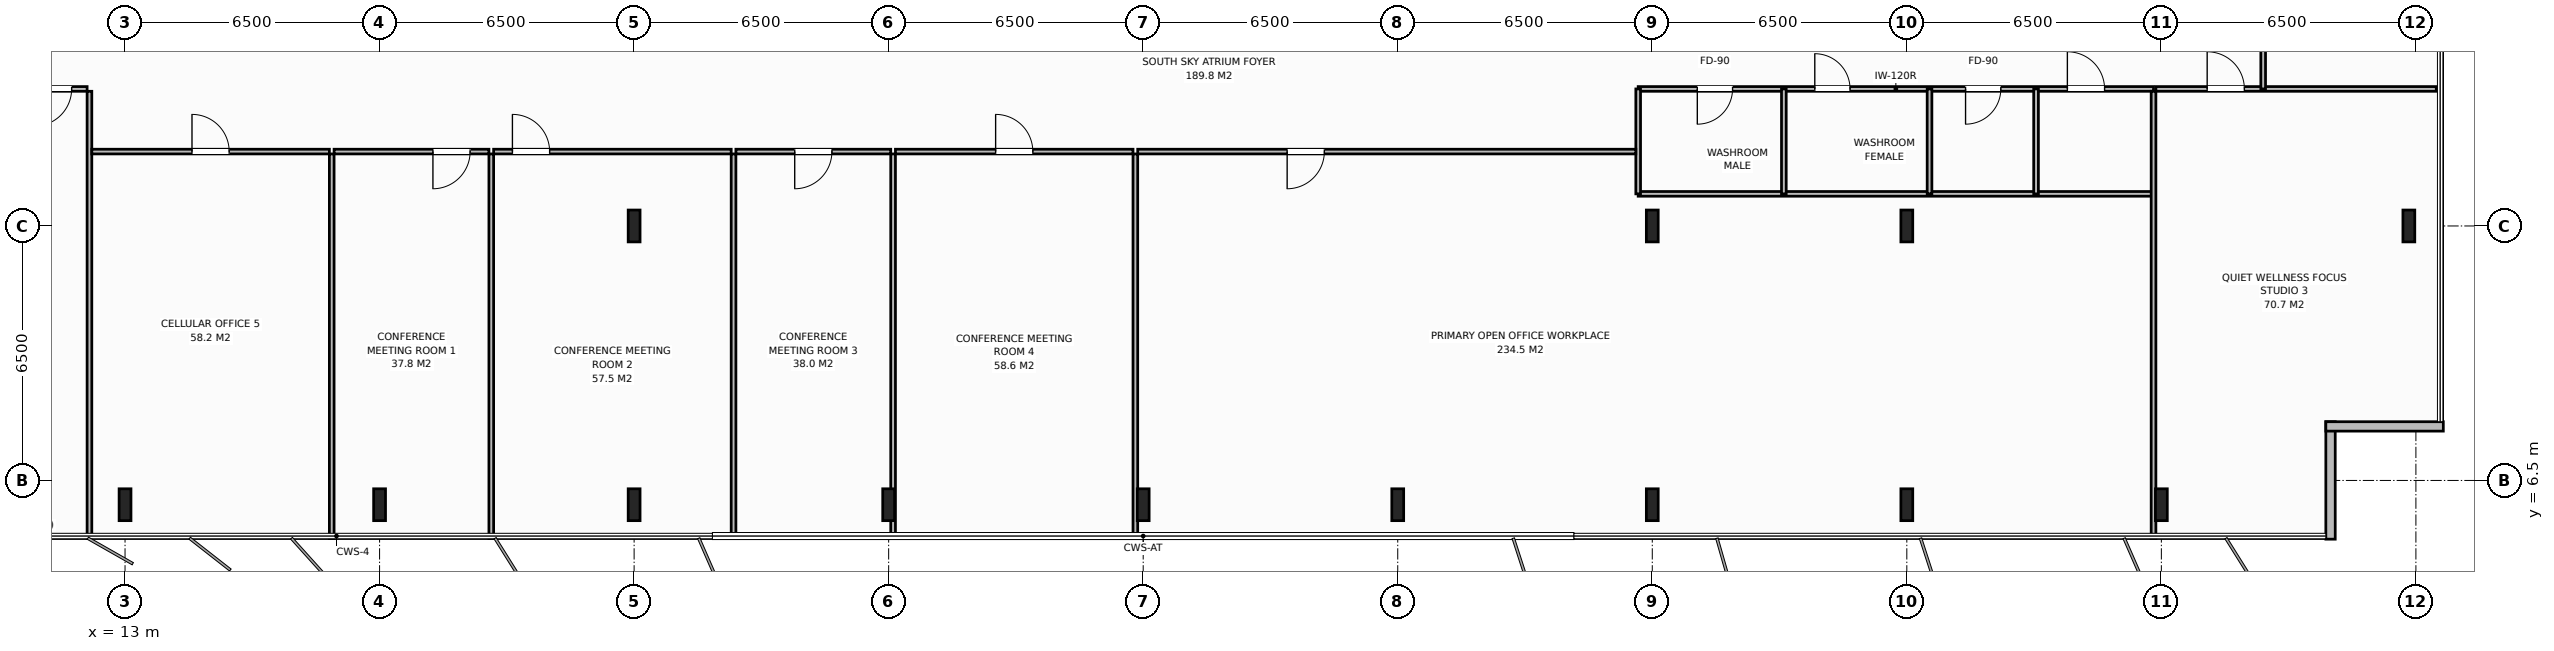
"""IFC4 building model, lengths in metres.
Left out: names, types, materials, properties, quantities, classifications, styles, units other than length and angle.
Written with IfcOpenShell. Run it as: python <this file> out.ifc"""

import sys

from ifc_helpers import new_model, si_unit, direction, frame, frame_2d, origin, origin_2d, place, context, subcontext, project, spatial, rectangle, i_section, extrude, element, fill, save


model = new_model("IFC4")
c1 = context("Model", 3, precision=1e-05, world=origin(), true_north=direction((0.0, 1.0)))
c2 = subcontext(c1, "Body", "Model", "MODEL_VIEW")
j1 = project(units=[si_unit("LENGTHUNIT", "METRE"), si_unit("PLANEANGLEUNIT", "RADIAN")], contexts=[c1])
p1 = place(None, origin())
s1 = spatial("IfcSite", under=j1, at=p1, CompositionType="ELEMENT")
p2 = place(p1, origin())
s2 = spatial("IfcBuilding", under=s1, at=p2, CompositionType="ELEMENT")
p3 = place(p2, frame((0.0, 0.0, 217.6)))
s3 = spatial("IfcBuildingStorey", under=s2, at=p3, CompositionType="ELEMENT", Elevation=217.6)
for number, where, z_axis, x_axis in (
    (1, (58.5, 13.0, 0.0), (0.0, 0.0, 1.0), (1.0, 0.0, 0.0)),
    (2, (26.0, 13.0, 0.0), (0.0, 0.0, 1.0), (1.0, 0.0, 0.0)),
    (3, (52.0, 13.0, 0.0), (0.0, 0.0, 1.0), (1.0, 0.0, 0.0)),
    (4, (13.0, 5.88, 0.0), (0.0, 0.0, 1.0), (1.0, 0.0, 0.0)),
    (5, (19.5, 5.88, 0.0), (0.0, 0.0, 1.0), (1.0, 0.0, 0.0)),
    (6, (26.0, 5.88, 0.0), (0.0, 0.0, 1.0), (1.0, 0.0, 0.0)),
    (7, (32.5, 5.88, 0.0), (0.0, 0.0, 1.0), (1.0, 0.0, 0.0)),
    (8, (39.0, 5.88, 0.0), (0.0, 0.0, 1.0), (1.0, 0.0, 0.0)),
    (9, (45.5, 5.88, 0.0), (0.0, 0.0, 1.0), (1.0, 0.0, 0.0)),
    (10, (52.0, 5.88, 0.0), (0.0, 0.0, 1.0), (1.0, 0.0, 0.0)),
    (11, (58.5, 5.88, 0.0), (0.0, 0.0, 1.0), (1.0, 0.0, 0.0)),
    (12, (65.0, 5.88, 0.0), (0.0, 0.0, 1.0), (1.0, 0.0, 0.0)),
    (13, (71.32, 13.0, 0.0), (0.0, 0.0, 1.0), (1.0, 0.0, 0.0)),
):
    element("IfcColumn", number, at=place(p3, frame(where, z_axis=z_axis, x_axis=x_axis)), inside=s3, PredefinedType="COLUMN", context=c2, shape_type="SweptSolid", body=[
        extrude(i_section(OverallWidth=0.303, OverallDepth=0.814, WebThickness=0.021, FlangeThickness=0.04, at=origin_2d()), origin(), (0.0, 0.0, 1.0), 3.8),
    ])
for number, where, z_axis, x_axis in (
    (14, (69.32, 8.0, 0.0), (0.0, 0.0, 1.0), (0.0, -1.0, 0.0)),
    (15, (72.2, 7.88, 0.0), (0.0, 0.0, 1.0), (-1.0, 0.0, 0.0)),
):
    element("IfcWall", number, at=place(p3, frame(where, z_axis=z_axis, x_axis=x_axis)), inside=s3, PredefinedType="STANDARD", context=c2, shape_type="SweptSolid", body=[
        extrude(rectangle(XDim=3.0, YDim=0.24, at=frame_2d((1.5, 0.0))), origin(), (0.0, 0.0, 1.0), 3.58),
    ])
p4 = place(p3, frame((51.64, 16.5, 0.0), z_axis=(0.0, 0.0, 1.0), x_axis=(1.0, 0.0, 0.0)))
e16 = element("IfcWall", 16, at=p4, inside=s3, PredefinedType="PARTITIONING", context=c2, shape_type="SweptSolid", body=[
    extrude(rectangle(XDim=13.16, YDim=0.12, at=frame_2d((6.58, 0.0))), origin(), (0.0, 0.0, 1.0), 3.58),
])
p5 = place(p4, frame((1.51, 0.0, 0.0)))
e17 = element("IfcOpeningElement", 17, at=p5, cuts=e16, PredefinedType="OPENING", context=c2, shape_type="SweptSolid", body=[
    extrude(rectangle(XDim=0.9, YDim=2.15, at=frame_2d((0.45, 1.075))), frame((0.0, 0.07, 0.0), z_axis=(0.0, -1.0, 0.0), x_axis=(1.0, 0.0, 0.0)), (0.0, 0.0, 1.0), 0.14),
])
p6 = place(p4, frame((4.51, 0.0, 0.0)))
e18 = element("IfcOpeningElement", 18, at=p6, cuts=e16, PredefinedType="OPENING", context=c2, shape_type="SweptSolid", body=[
    extrude(rectangle(XDim=0.9, YDim=2.15, at=frame_2d((0.45, 1.075))), frame((0.0, 0.07, 0.0), z_axis=(0.0, -1.0, 0.0), x_axis=(1.0, 0.0, 0.0)), (0.0, 0.0, 1.0), 0.14),
])
p7 = place(p4, frame((8.36, 0.0, 0.0)))
e19 = element("IfcOpeningElement", 19, at=p7, cuts=e16, PredefinedType="OPENING", context=c2, shape_type="SweptSolid", body=[
    extrude(rectangle(XDim=0.9, YDim=2.15, at=frame_2d((0.45, 1.075))), frame((0.0, 0.07, 0.0), z_axis=(0.0, -1.0, 0.0), x_axis=(1.0, 0.0, 0.0)), (0.0, 0.0, 1.0), 0.14),
])
p8 = place(p4, frame((10.96, 0.0, 0.0)))
e20 = element("IfcOpeningElement", 20, at=p8, cuts=e16, PredefinedType="OPENING", context=c2, shape_type="SweptSolid", body=[
    extrude(rectangle(XDim=0.95, YDim=2.15, at=frame_2d((0.475, 1.075))), frame((0.0, 0.07, 0.0), z_axis=(0.0, -1.0, 0.0), x_axis=(1.0, 0.0, 0.0)), (0.0, 0.0, 1.0), 0.14),
])
p9 = place(p3, frame((51.64, 13.82, 0.0), z_axis=(0.0, 0.0, 1.0), x_axis=(1.0, 0.0, 0.0)))
e21 = element("IfcWall", 21, at=p9, inside=s3, PredefinedType="PARTITIONING", context=c2, shape_type="SweptSolid", body=[
    extrude(rectangle(XDim=13.16, YDim=0.12, at=frame_2d((6.58, 0.0))), origin(), (0.0, 0.0, 1.0), 3.58),
])
for number, where, z_axis, x_axis in (
    (22, (51.64, 13.82, 0.0), (0.0, 0.0, 1.0), (0.0, 1.0, 0.0)),
    (23, (55.36, 13.82, 0.0), (0.0, 0.0, 1.0), (0.0, 1.0, 0.0)),
    (24, (59.08, 13.82, 0.0), (0.0, 0.0, 1.0), (0.0, 1.0, 0.0)),
    (25, (61.8, 13.82, 0.0), (0.0, 0.0, 1.0), (0.0, 1.0, 0.0)),
):
    element("IfcWall", number, at=place(p3, frame(where, z_axis=z_axis, x_axis=x_axis)), inside=s3, PredefinedType="PARTITIONING", context=c2, shape_type="SweptSolid", body=[
        extrude(rectangle(XDim=2.68, YDim=0.12, at=frame_2d((1.34, 0.0))), origin(), (0.0, 0.0, 1.0), 3.58),
    ])
p10 = place(p3, frame((12.091, 5.02, 0.0), z_axis=(0.0, 0.0, 1.0), x_axis=(0.0, 1.0, 0.0)))
e26 = element("IfcWall", 26, at=p10, inside=s3, PredefinedType="PARTITIONING", context=c2, shape_type="SweptSolid", body=[
    extrude(rectangle(XDim=11.42, YDim=0.12, at=frame_2d((5.71, 0.0))), origin(), (0.0, 0.0, 1.0), 3.58),
])
p11 = place(p3, frame((5.98, 16.5, 0.0), z_axis=(0.0, 0.0, 1.0), x_axis=(1.0, 0.0, 0.0)))
e27 = element("IfcWall", 27, at=p11, inside=s3, PredefinedType="PARTITIONING", context=c2, shape_type="SweptSolid", body=[
    extrude(rectangle(XDim=6.051, YDim=0.12, at=frame_2d((3.026, 0.0))), origin(), (0.0, 0.0, 1.0), 3.58),
])
p12 = place(p11, frame((4.706, 0.0, 0.0)))
e28 = element("IfcOpeningElement", 28, at=p12, cuts=e27, PredefinedType="OPENING", context=c2, shape_type="SweptSolid", body=[
    extrude(rectangle(XDim=0.95, YDim=2.15, at=frame_2d((0.475, 1.075))), frame((0.0, 0.07, 0.0), z_axis=(0.0, -1.0, 0.0), x_axis=(1.0, 0.0, 0.0)), (0.0, 0.0, 1.0), 0.14),
])
p13 = place(p3, frame((18.278, 5.02, 0.0), z_axis=(0.0, 0.0, 1.0), x_axis=(0.0, 1.0, 0.0)))
e29 = element("IfcWall", 29, at=p13, inside=s3, PredefinedType="PARTITIONING", context=c2, shape_type="SweptSolid", body=[
    extrude(rectangle(XDim=9.82, YDim=0.12, at=frame_2d((4.91, 0.0))), origin(), (0.0, 0.0, 1.0), 3.58),
])
p14 = place(p3, frame((12.151, 14.9, 0.0), z_axis=(0.0, 0.0, 1.0), x_axis=(1.0, 0.0, 0.0)))
e30 = element("IfcWall", 30, at=p14, inside=s3, PredefinedType="PARTITIONING", context=c2, shape_type="SweptSolid", body=[
    extrude(rectangle(XDim=6.067, YDim=0.12, at=frame_2d((3.033, 0.0))), origin(), (0.0, 0.0, 1.0), 3.58),
])
p15 = place(p14, frame((2.558, 0.0, 0.0)))
e31 = element("IfcOpeningElement", 31, at=p15, cuts=e30, PredefinedType="OPENING", context=c2, shape_type="SweptSolid", body=[
    extrude(rectangle(XDim=0.95, YDim=2.15, at=frame_2d((0.475, 1.075))), frame((0.0, 0.07, 0.0), z_axis=(0.0, -1.0, 0.0), x_axis=(1.0, 0.0, 0.0)), (0.0, 0.0, 1.0), 0.14),
])
p16 = place(p3, frame((22.352, 5.02, 0.0), z_axis=(0.0, 0.0, 1.0), x_axis=(0.0, 1.0, 0.0)))
e32 = element("IfcWall", 32, at=p16, inside=s3, PredefinedType="PARTITIONING", context=c2, shape_type="SweptSolid", body=[
    extrude(rectangle(XDim=9.82, YDim=0.12, at=frame_2d((4.91, 0.0))), origin(), (0.0, 0.0, 1.0), 3.58),
])
p17 = place(p3, frame((18.338, 14.9, 0.0), z_axis=(0.0, 0.0, 1.0), x_axis=(1.0, 0.0, 0.0)))
e33 = element("IfcWall", 33, at=p17, inside=s3, PredefinedType="PARTITIONING", context=c2, shape_type="SweptSolid", body=[
    extrude(rectangle(XDim=3.954, YDim=0.12, at=frame_2d((1.977, 0.0))), origin(), (0.0, 0.0, 1.0), 3.58),
])
p18 = place(p17, frame((2.524, 0.0, 0.0)))
e34 = element("IfcOpeningElement", 34, at=p18, cuts=e33, PredefinedType="OPENING", context=c2, shape_type="SweptSolid", body=[
    extrude(rectangle(XDim=0.95, YDim=2.15, at=frame_2d((0.475, 1.075))), frame((0.0, 0.07, 0.0), z_axis=(0.0, -1.0, 0.0), x_axis=(1.0, 0.0, 0.0)), (0.0, 0.0, 1.0), 0.14),
])
p19 = place(p3, frame((28.539, 5.02, 0.0), z_axis=(0.0, 0.0, 1.0), x_axis=(0.0, 1.0, 0.0)))
e35 = element("IfcWall", 35, at=p19, inside=s3, PredefinedType="PARTITIONING", context=c2, shape_type="SweptSolid", body=[
    extrude(rectangle(XDim=9.82, YDim=0.12, at=frame_2d((4.91, 0.0))), origin(), (0.0, 0.0, 1.0), 3.58),
])
p20 = place(p3, frame((22.412, 14.9, 0.0), z_axis=(0.0, 0.0, 1.0), x_axis=(1.0, 0.0, 0.0)))
e36 = element("IfcWall", 36, at=p20, inside=s3, PredefinedType="PARTITIONING", context=c2, shape_type="SweptSolid", body=[
    extrude(rectangle(XDim=6.067, YDim=0.12, at=frame_2d((3.033, 0.0))), origin(), (0.0, 0.0, 1.0), 3.58),
])
p21 = place(p20, frame((0.48, 0.0, 0.0)))
e37 = element("IfcOpeningElement", 37, at=p21, cuts=e36, PredefinedType="OPENING", context=c2, shape_type="SweptSolid", body=[
    extrude(rectangle(XDim=0.95, YDim=2.15, at=frame_2d((0.475, 1.075))), frame((0.0, 0.07, 0.0), z_axis=(0.0, -1.0, 0.0), x_axis=(1.0, 0.0, 0.0)), (0.0, 0.0, 1.0), 0.14),
])
p22 = place(p3, frame((32.613, 5.02, 0.0), z_axis=(0.0, 0.0, 1.0), x_axis=(0.0, 1.0, 0.0)))
e38 = element("IfcWall", 38, at=p22, inside=s3, PredefinedType="PARTITIONING", context=c2, shape_type="SweptSolid", body=[
    extrude(rectangle(XDim=9.82, YDim=0.12, at=frame_2d((4.91, 0.0))), origin(), (0.0, 0.0, 1.0), 2.88),
])
p23 = place(p3, frame((28.599, 14.9, 0.0), z_axis=(0.0, 0.0, 1.0), x_axis=(1.0, 0.0, 0.0)))
e39 = element("IfcWall", 39, at=p23, inside=s3, PredefinedType="PARTITIONING", context=c2, shape_type="SweptSolid", body=[
    extrude(rectangle(XDim=3.954, YDim=0.12, at=frame_2d((1.977, 0.0))), origin(), (0.0, 0.0, 1.0), 3.58),
])
p24 = place(p23, frame((1.502, 0.0, 0.0)))
e40 = element("IfcOpeningElement", 40, at=p24, cuts=e39, PredefinedType="OPENING", context=c2, shape_type="SweptSolid", body=[
    extrude(rectangle(XDim=0.95, YDim=2.15, at=frame_2d((0.475, 1.075))), frame((0.0, 0.07, 0.0), z_axis=(0.0, -1.0, 0.0), x_axis=(1.0, 0.0, 0.0)), (0.0, 0.0, 1.0), 0.14),
])
p25 = place(p3, frame((38.8, 5.02, 0.0), z_axis=(0.0, 0.0, 1.0), x_axis=(0.0, 1.0, 0.0)))
e41 = element("IfcWall", 41, at=p25, inside=s3, PredefinedType="PARTITIONING", context=c2, shape_type="SweptSolid", body=[
    extrude(rectangle(XDim=9.82, YDim=0.12, at=frame_2d((4.91, 0.0))), origin(), (0.0, 0.0, 1.0), 2.88),
])
p26 = place(p3, frame((32.673, 14.9, 0.0), z_axis=(0.0, 0.0, 1.0), x_axis=(1.0, 0.0, 0.0)))
e42 = element("IfcWall", 42, at=p26, inside=s3, PredefinedType="PARTITIONING", context=c2, shape_type="SweptSolid", body=[
    extrude(rectangle(XDim=6.067, YDim=0.12, at=frame_2d((3.033, 0.0))), origin(), (0.0, 0.0, 1.0), 3.58),
])
p27 = place(p26, frame((2.558, 0.0, 0.0)))
e43 = element("IfcOpeningElement", 43, at=p27, cuts=e42, PredefinedType="OPENING", context=c2, shape_type="SweptSolid", body=[
    extrude(rectangle(XDim=0.95, YDim=2.15, at=frame_2d((0.475, 1.075))), frame((0.0, 0.07, 0.0), z_axis=(0.0, -1.0, 0.0), x_axis=(1.0, 0.0, 0.0)), (0.0, 0.0, 1.0), 0.14),
])
p28 = place(p3, frame((64.8, 5.02, 0.0), z_axis=(0.0, 0.0, 1.0), x_axis=(0.0, 1.0, 0.0)))
e44 = element("IfcWall", 44, at=p28, inside=s3, PredefinedType="PARTITIONING", context=c2, shape_type="SweptSolid", body=[
    extrude(rectangle(XDim=11.42, YDim=0.12, at=frame_2d((5.71, 0.0))), origin(), (0.0, 0.0, 1.0), 2.88),
])
p29 = place(p3, frame((38.86, 14.9, 0.0), z_axis=(0.0, 0.0, 1.0), x_axis=(1.0, 0.0, 0.0)))
e45 = element("IfcWall", 45, at=p29, inside=s3, PredefinedType="PARTITIONING", context=c2, shape_type="SweptSolid", body=[
    extrude(rectangle(XDim=12.72, YDim=0.12, at=frame_2d((6.36, 0.0))), origin(), (0.0, 0.0, 1.0), 3.58),
])
p30 = place(p29, frame((3.816, 0.0, 0.0)))
e46 = element("IfcOpeningElement", 46, at=p30, cuts=e45, PredefinedType="OPENING", context=c2, shape_type="SweptSolid", body=[
    extrude(rectangle(XDim=0.95, YDim=2.15, at=frame_2d((0.475, 1.075))), frame((0.0, 0.07, 0.0), z_axis=(0.0, -1.0, 0.0), x_axis=(1.0, 0.0, 0.0)), (0.0, 0.0, 1.0), 0.14),
])
p31 = place(p3, frame((64.86, 16.5, 0.0), z_axis=(0.0, 0.0, 1.0), x_axis=(1.0, 0.0, 0.0)))
e47 = element("IfcWall", 47, at=p31, inside=s3, PredefinedType="PARTITIONING", context=c2, shape_type="SweptSolid", body=[
    extrude(rectangle(XDim=7.16, YDim=0.12, at=frame_2d((3.58, 0.0))), origin(), (0.0, 0.0, 1.0), 3.58),
])
p32 = place(p31, frame((1.31, 0.0, 0.0)))
e48 = element("IfcOpeningElement", 48, at=p32, cuts=e47, PredefinedType="OPENING", context=c2, shape_type="SweptSolid", body=[
    extrude(rectangle(XDim=0.95, YDim=2.15, at=frame_2d((0.475, 1.075))), frame((0.0, 0.07, 0.0), z_axis=(0.0, -1.0, 0.0), x_axis=(1.0, 0.0, 0.0)), (0.0, 0.0, 1.0), 0.14),
])
p33 = place(p3, frame((67.6, 16.5, 0.0), z_axis=(0.0, 0.0, 1.0), x_axis=(0.0, 1.0, 0.0)))
e49 = element("IfcWall", 49, at=p33, inside=s3, PredefinedType="PARTITIONING", context=c2, shape_type="SweptSolid", body=[
    extrude(rectangle(XDim=19.0, YDim=0.12, at=frame_2d((9.5, 0.0))), origin(), (0.0, 0.0, 1.0), 3.58),
])
p34 = place(p33, frame((9.025, 0.0, 0.0)))
e50 = element("IfcOpeningElement", 50, at=p34, cuts=e49, PredefinedType="OPENING", context=c2, shape_type="SweptSolid", body=[
    extrude(rectangle(XDim=0.95, YDim=2.15, at=frame_2d((0.475, 1.075))), frame((0.0, 0.07, 0.0), z_axis=(0.0, -1.0, 0.0), x_axis=(1.0, 0.0, 0.0)), (0.0, 0.0, 1.0), 0.14),
])
p35 = place(p5, origin())
e51 = element("IfcDoor", 51, at=p35, inside=s3, OperationType="SINGLE_SWING_RIGHT", PredefinedType="DOOR", context=c2, shape_type="SweptSolid", body=[
    extrude(rectangle(XDim=0.9, YDim=2.15, at=frame_2d((0.45, 1.075))), frame((0.0, 0.025, 0.0), z_axis=(0.0, -1.0, 0.0), x_axis=(1.0, 0.0, 0.0)), (0.0, 0.0, 1.0), 0.05),
])
fill(e17, e51)
p36 = place(p6, origin())
e52 = element("IfcDoor", 52, at=p36, inside=s3, OperationType="SINGLE_SWING_LEFT", PredefinedType="DOOR", context=c2, shape_type="SweptSolid", body=[
    extrude(rectangle(XDim=0.9, YDim=2.15, at=frame_2d((0.45, 1.075))), frame((0.0, 0.025, 0.0), z_axis=(0.0, -1.0, 0.0), x_axis=(1.0, 0.0, 0.0)), (0.0, 0.0, 1.0), 0.05),
])
fill(e18, e52)
p37 = place(p7, origin())
e53 = element("IfcDoor", 53, at=p37, inside=s3, OperationType="SINGLE_SWING_RIGHT", PredefinedType="DOOR", context=c2, shape_type="SweptSolid", body=[
    extrude(rectangle(XDim=0.9, YDim=2.15, at=frame_2d((0.45, 1.075))), frame((0.0, 0.025, 0.0), z_axis=(0.0, -1.0, 0.0), x_axis=(1.0, 0.0, 0.0)), (0.0, 0.0, 1.0), 0.05),
])
fill(e19, e53)
p38 = place(p8, origin())
e54 = element("IfcDoor", 54, at=p38, inside=s3, OperationType="SINGLE_SWING_LEFT", PredefinedType="DOOR", context=c2, shape_type="SweptSolid", body=[
    extrude(rectangle(XDim=0.95, YDim=2.15, at=frame_2d((0.475, 1.075))), frame((0.0, 0.025, 0.0), z_axis=(0.0, -1.0, 0.0), x_axis=(1.0, 0.0, 0.0)), (0.0, 0.0, 1.0), 0.05),
])
fill(e20, e54)
p39 = place(p12, origin())
e55 = element("IfcDoor", 55, at=p39, inside=s3, OperationType="SINGLE_SWING_RIGHT", PredefinedType="DOOR", context=c2, shape_type="SweptSolid", body=[
    extrude(rectangle(XDim=0.95, YDim=2.15, at=frame_2d((0.475, 1.075))), frame((0.0, 0.025, 0.0), z_axis=(0.0, -1.0, 0.0), x_axis=(1.0, 0.0, 0.0)), (0.0, 0.0, 1.0), 0.05),
])
fill(e28, e55)
p40 = place(p15, origin())
e56 = element("IfcDoor", 56, at=p40, inside=s3, OperationType="SINGLE_SWING_LEFT", PredefinedType="DOOR", context=c2, shape_type="SweptSolid", body=[
    extrude(rectangle(XDim=0.95, YDim=2.15, at=frame_2d((0.475, 1.075))), frame((0.0, 0.025, 0.0), z_axis=(0.0, -1.0, 0.0), x_axis=(1.0, 0.0, 0.0)), (0.0, 0.0, 1.0), 0.05),
])
fill(e31, e56)
p41 = place(p18, origin())
e57 = element("IfcDoor", 57, at=p41, inside=s3, OperationType="SINGLE_SWING_RIGHT", PredefinedType="DOOR", context=c2, shape_type="SweptSolid", body=[
    extrude(rectangle(XDim=0.95, YDim=2.15, at=frame_2d((0.475, 1.075))), frame((0.0, 0.025, 0.0), z_axis=(0.0, -1.0, 0.0), x_axis=(1.0, 0.0, 0.0)), (0.0, 0.0, 1.0), 0.05),
])
fill(e34, e57)
p42 = place(p21, origin())
e58 = element("IfcDoor", 58, at=p42, inside=s3, OperationType="SINGLE_SWING_LEFT", PredefinedType="DOOR", context=c2, shape_type="SweptSolid", body=[
    extrude(rectangle(XDim=0.95, YDim=2.15, at=frame_2d((0.475, 1.075))), frame((0.0, 0.025, 0.0), z_axis=(0.0, -1.0, 0.0), x_axis=(1.0, 0.0, 0.0)), (0.0, 0.0, 1.0), 0.05),
])
fill(e37, e58)
p43 = place(p24, origin())
e59 = element("IfcDoor", 59, at=p43, inside=s3, OperationType="SINGLE_SWING_RIGHT", PredefinedType="DOOR", context=c2, shape_type="SweptSolid", body=[
    extrude(rectangle(XDim=0.95, YDim=2.15, at=frame_2d((0.475, 1.075))), frame((0.0, 0.025, 0.0), z_axis=(0.0, -1.0, 0.0), x_axis=(1.0, 0.0, 0.0)), (0.0, 0.0, 1.0), 0.05),
])
fill(e40, e59)
p44 = place(p27, origin())
e60 = element("IfcDoor", 60, at=p44, inside=s3, OperationType="SINGLE_SWING_LEFT", PredefinedType="DOOR", context=c2, shape_type="SweptSolid", body=[
    extrude(rectangle(XDim=0.95, YDim=2.15, at=frame_2d((0.475, 1.075))), frame((0.0, 0.025, 0.0), z_axis=(0.0, -1.0, 0.0), x_axis=(1.0, 0.0, 0.0)), (0.0, 0.0, 1.0), 0.05),
])
fill(e43, e60)
p45 = place(p30, origin())
e61 = element("IfcDoor", 61, at=p45, inside=s3, OperationType="SINGLE_SWING_RIGHT", PredefinedType="DOOR", context=c2, shape_type="SweptSolid", body=[
    extrude(rectangle(XDim=0.95, YDim=2.15, at=frame_2d((0.475, 1.075))), frame((0.0, 0.025, 0.0), z_axis=(0.0, -1.0, 0.0), x_axis=(1.0, 0.0, 0.0)), (0.0, 0.0, 1.0), 0.05),
])
fill(e46, e61)
p46 = place(p32, origin())
e62 = element("IfcDoor", 62, at=p46, inside=s3, OperationType="SINGLE_SWING_LEFT", PredefinedType="DOOR", context=c2, shape_type="SweptSolid", body=[
    extrude(rectangle(XDim=0.95, YDim=2.15, at=frame_2d((0.475, 1.075))), frame((0.0, 0.025, 0.0), z_axis=(0.0, -1.0, 0.0), x_axis=(1.0, 0.0, 0.0)), (0.0, 0.0, 1.0), 0.05),
])
fill(e48, e62)
save(model, sys.argv[1])
